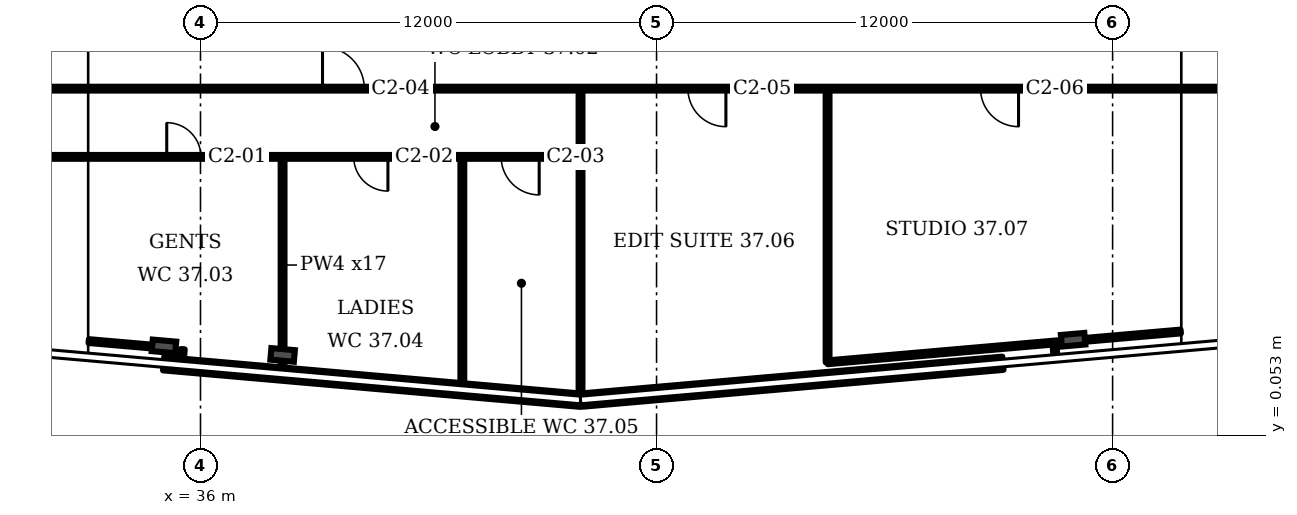
"""IFC4 building model, lengths in metres.
Left out: names, types, materials, properties, quantities, classifications, styles, units other than length and angle.
Written with IfcOpenShell. Run it as: python <this file> out.ifc"""

import sys

from ifc_helpers import new_model, si_unit, direction, frame, frame_2d, origin, origin_2d, place, context, subcontext, project, spatial, rectangle, i_section, extrude, element, fill, save


model = new_model("IFC4")
c1 = context("Model", 3, precision=1e-05, world=origin(), true_north=direction((0.0, 1.0)))
c2 = subcontext(c1, "Body", "Model", "MODEL_VIEW")
j1 = project(units=[si_unit("LENGTHUNIT", "METRE"), si_unit("PLANEANGLEUNIT", "RADIAN")], contexts=[c1])
p1 = place(None, origin())
s1 = spatial("IfcSite", under=j1, at=p1, CompositionType="ELEMENT")
p2 = place(p1, origin())
s2 = spatial("IfcBuilding", under=s1, at=p2, CompositionType="ELEMENT")
p3 = place(p2, frame((0.0, 0.0, 155.5)))
s3 = spatial("IfcBuildingStorey", under=s2, at=p3, CompositionType="ELEMENT", Elevation=155.5)
for number, where, z_axis, x_axis in (
    (1, (35.039, 2.399, 0.0), (0.0, 0.0, 1.0), (-0.087, -0.996, 0.0)),
    (2, (38.161, 2.174, 0.0), (0.0, 0.0, 1.0), (-0.087, -0.996, 0.0)),
    (3, (58.961, 2.573, 0.0), (0.0, 0.0, 1.0), (0.087, -0.996, 0.0)),
):
    element("IfcColumn", number, at=place(p3, frame(where, z_axis=z_axis, x_axis=x_axis)), inside=s3, PredefinedType="COLUMN", context=c2, shape_type="SweptSolid", body=[
        extrude(i_section(OverallWidth=0.305, OverallDepth=0.62, WebThickness=0.021, FlangeThickness=0.04, FilletRadius=0.027, at=origin_2d()), origin(), (0.0, 0.0, 1.0), 3.6),
    ])
p4 = place(p3, frame((35.03, 1.943, 0.0), z_axis=(0.0, 0.0, 1.0), x_axis=(0.996199, -0.08714, 0.0)))
e4 = element("IfcWall", 4, at=p4, inside=s3, PredefinedType="SOLIDWALL", context=c2, shape_type="SweptSolid", body=[
    extrude(rectangle(XDim=11.028, YDim=0.35, at=frame_2d((5.514, 0.0))), origin(), (0.0, 0.0, 1.0), 1.0),
])
p5 = place(p3, frame((46.045, 0.987, 0.0), z_axis=(0.0, 0.0, 1.0), x_axis=(0.996193, 0.087171, 0.0)))
e5 = element("IfcWall", 5, at=p5, inside=s3, PredefinedType="SOLIDWALL", context=c2, shape_type="SweptSolid", body=[
    extrude(rectangle(XDim=11.11, YDim=0.35, at=frame_2d((5.555, 0.0))), origin(), (0.0, 0.0, 1.0), 1.0),
])
p6 = place(p3, frame((31.714, 7.385, 0.0), z_axis=(0.0, 0.0, 1.0), x_axis=(1.0, 0.0, 0.0)))
e6 = element("IfcWall", 6, at=p6, inside=s3, PredefinedType="PARTITIONING", context=c2, shape_type="SweptSolid", body=[
    extrude(rectangle(XDim=14.286, YDim=0.1, at=frame_2d((7.143, 0.0))), origin(), (0.0, 0.0, 1.0), 3.2),
])
p7 = place(p6, frame((3.398, 0.0, 0.0)))
e7 = element("IfcOpeningElement", 7, at=p7, cuts=e6, PredefinedType="OPENING", context=c2, shape_type="SweptSolid", body=[
    extrude(rectangle(XDim=0.9, YDim=2.1, at=frame_2d((0.45, 1.05))), frame((0.0, 0.06, 0.0), z_axis=(0.0, -1.0, 0.0), x_axis=(1.0, 0.0, 0.0)), (0.0, 0.0, 1.0), 0.12),
])
p8 = place(p6, frame((8.318, 0.0, 0.0)))
e8 = element("IfcOpeningElement", 8, at=p8, cuts=e6, PredefinedType="OPENING", context=c2, shape_type="SweptSolid", body=[
    extrude(rectangle(XDim=0.9, YDim=2.1, at=frame_2d((0.45, 1.05))), frame((0.0, 0.06, 0.0), z_axis=(0.0, -1.0, 0.0), x_axis=(1.0, 0.0, 0.0)), (0.0, 0.0, 1.0), 0.12),
])
p9 = place(p6, frame((12.198, 0.0, 0.0)))
e9 = element("IfcOpeningElement", 9, at=p9, cuts=e6, PredefinedType="OPENING", context=c2, shape_type="SweptSolid", body=[
    extrude(rectangle(XDim=1.0, YDim=2.1, at=frame_2d((0.5, 1.05))), frame((0.0, 0.06, 0.0), z_axis=(0.0, -1.0, 0.0), x_axis=(1.0, 0.0, 0.0)), (0.0, 0.0, 1.0), 0.12),
])
p10 = place(p3, frame((31.714, 9.18, 0.0), z_axis=(0.0, 0.0, 1.0), x_axis=(1.0, 0.0, 0.0)))
e10 = element("IfcWall", 10, at=p10, inside=s3, PredefinedType="PARTITIONING", context=c2, shape_type="SweptSolid", body=[
    extrude(rectangle(XDim=32.072, YDim=0.1, at=frame_2d((16.036, 0.0))), origin(), (0.0, 0.0, 1.0), 3.2),
])
p11 = place(p10, frame((7.497, 0.0, 0.0)))
e11 = element("IfcOpeningElement", 11, at=p11, cuts=e10, PredefinedType="OPENING", context=c2, shape_type="SweptSolid", body=[
    extrude(rectangle(XDim=1.1, YDim=2.1, at=frame_2d((0.55, 1.05))), frame((0.0, 0.06, 0.0), z_axis=(0.0, -1.0, 0.0), x_axis=(1.0, 0.0, 0.0)), (0.0, 0.0, 1.0), 0.12),
])
p12 = place(p10, frame((17.111, 0.0, 0.0)))
e12 = element("IfcOpeningElement", 12, at=p12, cuts=e10, PredefinedType="OPENING", context=c2, shape_type="SweptSolid", body=[
    extrude(rectangle(XDim=1.0, YDim=2.1, at=frame_2d((0.5, 1.05))), frame((0.0, 0.06, 0.0), z_axis=(0.0, -1.0, 0.0), x_axis=(1.0, 0.0, 0.0)), (0.0, 0.0, 1.0), 0.12),
])
p13 = place(p10, frame((24.811, 0.0, 0.0)))
e13 = element("IfcOpeningElement", 13, at=p13, cuts=e10, PredefinedType="OPENING", context=c2, shape_type="SweptSolid", body=[
    extrude(rectangle(XDim=1.0, YDim=2.1, at=frame_2d((0.5, 1.05))), frame((0.0, 0.06, 0.0), z_axis=(0.0, -1.0, 0.0), x_axis=(1.0, 0.0, 0.0)), (0.0, 0.0, 1.0), 0.12),
])
p14 = place(p3, frame((35.0, 2.37, 0.0), z_axis=(0.0, 0.0, 1.0), x_axis=(-0.996265, 0.086343, 0.0)))
e14 = element("IfcWall", 14, at=p14, inside=s3, PredefinedType="PARTITIONING", context=c2, shape_type="SweptSolid", body=[
    extrude(rectangle(XDim=1.948, YDim=0.1, at=frame_2d((0.974, 0.0))), origin(), (0.0, 0.0, 1.0), 2.58),
])
p15 = place(p3, frame((35.502, 1.927, 0.0), z_axis=(0.0, 0.0, 1.0), x_axis=(0.083045, 0.996542, 0.0)))
e15 = element("IfcWall", 15, at=p15, inside=s3, PredefinedType="PARTITIONING", context=c2, shape_type="SweptSolid", body=[
    extrude(rectangle(XDim=0.4, YDim=0.1, at=frame_2d((0.2, 0.0))), origin(), (0.0, 0.0, 1.0), 3.2),
])
p16 = place(p3, frame((38.16, 1.694, 0.0), z_axis=(0.0, 0.0, 1.0), x_axis=(0.0, 1.0, 0.0)))
e16 = element("IfcWall", 16, at=p16, inside=s3, PredefinedType="PARTITIONING", context=c2, shape_type="SweptSolid", body=[
    extrude(rectangle(XDim=5.691, YDim=0.1, at=frame_2d((2.846, 0.0))), origin(), (0.0, 0.0, 1.0), 3.2),
])
p17 = place(p3, frame((42.89, 1.28, 0.0), z_axis=(0.0, 0.0, 1.0), x_axis=(0.0, 1.0, 0.0)))
e17 = element("IfcWall", 17, at=p17, inside=s3, PredefinedType="PARTITIONING", context=c2, shape_type="SweptSolid", body=[
    extrude(rectangle(XDim=6.105, YDim=0.1, at=frame_2d((3.052, 0.0))), origin(), (0.0, 0.0, 1.0), 3.2),
])
p18 = place(p3, frame((46.0, 1.008, 0.0), z_axis=(0.0, 0.0, 1.0), x_axis=(0.0, 1.0, 0.0)))
e18 = element("IfcWall", 18, at=p18, inside=s3, PredefinedType="PARTITIONING", context=c2, shape_type="SweptSolid", body=[
    extrude(rectangle(XDim=8.172, YDim=0.1, at=frame_2d((4.086, 0.0))), origin(), (0.0, 0.0, 1.0), 3.2),
])
p19 = place(p3, frame((52.5, 1.98, 0.0), z_axis=(0.0, 0.0, 1.0), x_axis=(0.0, 1.0, 0.0)))
e19 = element("IfcWall", 19, at=p19, inside=s3, PredefinedType="PARTITIONING", context=c2, shape_type="SweptSolid", body=[
    extrude(rectangle(XDim=7.205, YDim=0.1, at=frame_2d((3.603, 0.0))), origin(), (0.0, 0.0, 1.0), 3.2),
])
p20 = place(p3, frame((52.5, 1.98, 0.0), z_axis=(0.0, 0.0, 1.0), x_axis=(0.99622, 0.086844, 0.0)))
e20 = element("IfcWall", 20, at=p20, inside=s3, PredefinedType="PARTITIONING", context=c2, shape_type="SweptSolid", body=[
    extrude(rectangle(XDim=9.328, YDim=0.1, at=frame_2d((4.664, 0.0))), origin(), (0.0, 0.0, 1.0), 2.58),
])
p21 = place(p3, frame((58.498, 2.102, 0.0), z_axis=(0.0, 0.0, 1.0), x_axis=(-0.083045, 0.996542, 0.0)))
e21 = element("IfcWall", 21, at=p21, inside=s3, PredefinedType="PARTITIONING", context=c2, shape_type="SweptSolid", body=[
    extrude(rectangle(XDim=0.4, YDim=0.1, at=frame_2d((0.2, 0.0))), origin(), (0.0, 0.0, 1.0), 3.2),
])
p22 = place(p7, origin())
e22 = element("IfcDoor", 22, at=p22, inside=s3, OperationType="SINGLE_SWING_LEFT", PredefinedType="DOOR", context=c2, shape_type="SweptSolid", body=[
    extrude(rectangle(XDim=0.9, YDim=2.1, at=frame_2d((0.45, 1.05))), frame((0.0, 0.025, 0.0), z_axis=(0.0, -1.0, 0.0), x_axis=(1.0, 0.0, 0.0)), (0.0, 0.0, 1.0), 0.05),
])
fill(e7, e22)
p23 = place(p8, origin())
e23 = element("IfcDoor", 23, at=p23, inside=s3, OperationType="SINGLE_SWING_RIGHT", PredefinedType="DOOR", context=c2, shape_type="SweptSolid", body=[
    extrude(rectangle(XDim=0.9, YDim=2.1, at=frame_2d((0.45, 1.05))), frame((0.0, 0.025, 0.0), z_axis=(0.0, -1.0, 0.0), x_axis=(1.0, 0.0, 0.0)), (0.0, 0.0, 1.0), 0.05),
])
fill(e8, e23)
p24 = place(p9, origin())
e24 = element("IfcDoor", 24, at=p24, inside=s3, OperationType="SINGLE_SWING_RIGHT", PredefinedType="DOOR", context=c2, shape_type="SweptSolid", body=[
    extrude(rectangle(XDim=1.0, YDim=2.1, at=frame_2d((0.5, 1.05))), frame((0.0, 0.025, 0.0), z_axis=(0.0, -1.0, 0.0), x_axis=(1.0, 0.0, 0.0)), (0.0, 0.0, 1.0), 0.05),
])
fill(e9, e24)
p25 = place(p11, origin())
e25 = element("IfcDoor", 25, at=p25, inside=s3, OperationType="SINGLE_SWING_LEFT", PredefinedType="DOOR", context=c2, shape_type="SweptSolid", body=[
    extrude(rectangle(XDim=1.1, YDim=2.1, at=frame_2d((0.55, 1.05))), frame((0.0, 0.025, 0.0), z_axis=(0.0, -1.0, 0.0), x_axis=(1.0, 0.0, 0.0)), (0.0, 0.0, 1.0), 0.05),
])
fill(e11, e25)
p26 = place(p12, origin())
e26 = element("IfcDoor", 26, at=p26, inside=s3, OperationType="SINGLE_SWING_RIGHT", PredefinedType="DOOR", context=c2, shape_type="SweptSolid", body=[
    extrude(rectangle(XDim=1.0, YDim=2.1, at=frame_2d((0.5, 1.05))), frame((0.0, 0.025, 0.0), z_axis=(0.0, -1.0, 0.0), x_axis=(1.0, 0.0, 0.0)), (0.0, 0.0, 1.0), 0.05),
])
fill(e12, e26)
p27 = place(p13, origin())
e27 = element("IfcDoor", 27, at=p27, inside=s3, OperationType="SINGLE_SWING_RIGHT", PredefinedType="DOOR", context=c2, shape_type="SweptSolid", body=[
    extrude(rectangle(XDim=1.0, YDim=2.1, at=frame_2d((0.5, 1.05))), frame((0.0, 0.025, 0.0), z_axis=(0.0, -1.0, 0.0), x_axis=(1.0, 0.0, 0.0)), (0.0, 0.0, 1.0), 0.05),
])
fill(e13, e27)
save(model, sys.argv[1])
